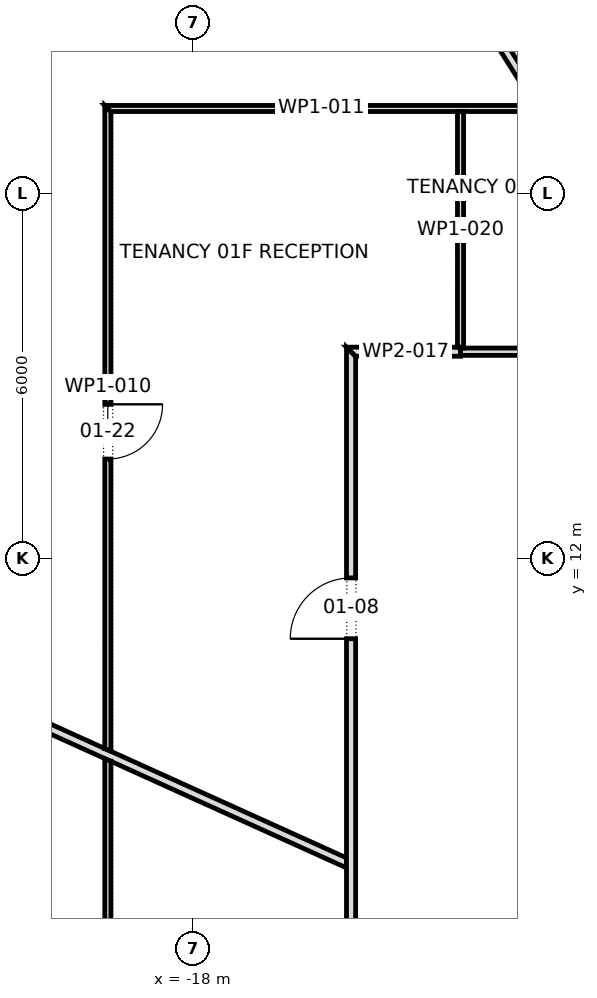
"""IFC4 building model, lengths in metres.
Left out: names, types, materials, properties, quantities, classifications, styles, units other than length and angle.
Written with IfcOpenShell. Run it as: python <this file> out.ifc"""

import sys

from ifc_helpers import new_model, si_unit, direction, frame, frame_2d, origin, place, context, subcontext, project, spatial, polyline, rectangle, outline, extrude, element, fill, save


model = new_model("IFC4")
c1 = context("Model", 3, precision=1e-05, world=origin(), true_north=direction((0.0, 1.0)))
c2 = subcontext(c1, "Body", "Model", "MODEL_VIEW")
j1 = project(units=[si_unit("LENGTHUNIT", "METRE"), si_unit("PLANEANGLEUNIT", "RADIAN")], contexts=[c1])
p1 = place(None, origin())
s1 = spatial("IfcSite", under=j1, at=p1, CompositionType="ELEMENT")
p2 = place(p1, origin())
s2 = spatial("IfcBuilding", under=s1, at=p2, CompositionType="ELEMENT")
p3 = place(p2, frame((0.0, 0.0, 31.9)))
s3 = spatial("IfcBuildingStorey", under=s2, at=p3, CompositionType="ELEMENT", Elevation=31.9)
p4 = place(p3, frame((-31.045, 14.036, 0.0), z_axis=(0.0, 0.0, 1.0), x_axis=(0.911148076593, -0.412079097407, 0.0)))
e1 = element("IfcWall", 1, at=p4, inside=s3, PredefinedType="PARTITIONING", context=c2, shape_type="SweptSolid", body=[
    extrude(outline(polyline([(0.0, -0.075), (1.838, -0.075), (3.677, -0.075), (5.515, -0.075), (7.353, -0.075), (9.191, -0.075), (11.03, -0.075), (12.868, -0.075), (12.869, -0.074), (12.87, -0.075), (14.287, -0.075), (15.705, -0.075), (17.123, -0.075), (17.106, -0.038), (17.106, -0.038), (17.055, 0.075), (15.602, 0.075), (14.149, 0.075), (12.696, 0.075), (12.693, 0.074), (12.692, 0.075), (10.882, 0.075), (9.072, 0.075), (7.262, 0.075), (5.452, 0.075), (3.642, 0.075), (1.831, 0.075), (0.021, 0.075), (0.002, -0.001), (0.0, -0.075)])), origin(), (0.0, 0.0, 1.0), 2.91),
])
p5 = place(p3, frame((-19.4, -1.539, 0.0), z_axis=(0.0, 0.0, 1.0), x_axis=(0.0, 1.0, 0.0)))
e2 = element("IfcWall", 2, at=p5, inside=s3, PredefinedType="PARTITIONING", context=c2, shape_type="SweptSolid", body=[
    extrude(outline(polyline([(0.008, -0.05), (1.707, -0.05), (3.406, -0.05), (5.105, -0.05), (6.804, -0.05), (8.503, -0.05), (10.203, -0.05), (10.248, 0.049), (10.248, 0.05), (8.415, 0.05), (6.583, 0.05), (6.583, 0.048), (6.575, 0.05), (4.932, 0.05), (3.288, 0.05), (1.644, 0.05), (0.0, 0.05), (0.0, 0.046), (0.008, -0.05)])), origin(), (0.0, 0.0, 1.0), 3.9),
])
p6 = place(p5, frame((2.773, 0.0, 0.0)))
e3 = element("IfcOpeningElement", 3, at=p6, cuts=e2, PredefinedType="OPENING", context=c2, shape_type="SweptSolid", body=[
    extrude(rectangle(XDim=0.9, YDim=2.1, at=frame_2d((0.45, 1.05))), frame((0.0, 0.062, 0.0), z_axis=(0.0, -1.0, 0.0), x_axis=(1.0, 0.0, 0.0)), (0.0, 0.0, 1.0), 0.124),
])
p7 = place(p3, frame((-19.438, 4.99, 0.0), z_axis=(0.0, 0.0, 1.0), x_axis=(-0.968638974519, 0.248472407007, 0.0)))
e4 = element("IfcWall", 4, at=p7, inside=s3, PredefinedType="PARTITIONING", context=c2, shape_type="SweptSolid", body=[
    extrude(outline(polyline([(0.025, -0.05), (1.859, -0.05), (3.693, -0.05), (5.527, -0.05), (7.361, -0.05), (9.195, -0.05), (11.029, -0.05), (12.863, -0.05), (14.697, -0.05), (14.706, -0.004), (14.706, 0.05), (12.868, 0.05), (11.03, 0.05), (9.191, 0.05), (7.353, 0.05), (5.515, 0.05), (3.677, 0.05), (1.838, 0.05), (0.0, 0.05), (0.0, 0.049), (0.025, -0.05)])), origin(), (0.0, 0.0, 1.0), 2.892),
])
p8 = place(p7, frame((7.037, 0.0, 0.0)))
e5 = element("IfcOpeningElement", 5, at=p8, cuts=e4, PredefinedType="OPENING", context=c2, shape_type="SweptSolid", body=[
    extrude(rectangle(XDim=0.9, YDim=2.1, at=frame_2d((0.45, 1.05))), frame((0.0, 0.062, 0.0), z_axis=(0.0, -1.0, 0.0), x_axis=(1.0, 0.0, 0.0)), (0.0, 0.0, 1.0), 0.124),
])
p9 = place(p3, frame((-19.4, 8.829, 0.0), z_axis=(0.0, 0.0, 1.0), x_axis=(0.0, 1.0, 0.0)))
e6 = element("IfcWall", 6, at=p9, inside=s3, PredefinedType="PARTITIONING", context=c2, shape_type="SweptSolid", body=[
    extrude(outline(polyline([(0.0, -0.05), (1.753, -0.05), (3.507, -0.05), (5.26, -0.05), (7.014, -0.05), (8.767, -0.05), (10.521, -0.05), (10.521, -0.05), (10.621, 0.05), (8.858, 0.05), (7.095, 0.05), (5.333, 0.05), (3.57, 0.05), (1.808, 0.05), (0.045, 0.05), (0.0, -0.049), (0.0, -0.05)])), origin(), (0.0, 0.0, 1.0), 3.9),
])
p10 = place(p9, frame((4.806, 0.0, 0.0)))
e7 = element("IfcOpeningElement", 7, at=p10, cuts=e6, PredefinedType="OPENING", context=c2, shape_type="SweptSolid", body=[
    extrude(rectangle(XDim=0.9, YDim=2.1, at=frame_2d((0.45, 1.05))), frame((0.0, 0.062, 0.0), z_axis=(0.0, -1.0, 0.0), x_axis=(1.0, 0.0, 0.0)), (0.0, 0.0, 1.0), 0.124),
])
p11 = place(p3, frame((-19.45, 19.4, 0.0), z_axis=(0.0, 0.0, 1.0), x_axis=(1.0, 0.0, 0.0)))
e8 = element("IfcWall", 8, at=p11, inside=s3, PredefinedType="PARTITIONING", context=c2, shape_type="SweptSolid", body=[
    extrude(outline(polyline([(7.075, 0.05), (5.306, 0.05), (3.538, 0.05), (1.769, 0.05), (0.0, 0.05), (0.1, -0.05), (1.844, -0.05), (3.587, -0.05), (5.331, -0.05), (7.075, -0.05), (7.075, 0.05)])), origin(), (0.0, 0.0, 1.0), 3.9),
])
p12 = place(p3, frame((-16.592, 26.26, 0.0), z_axis=(0.0, 0.0, 1.0), x_axis=(0.534158681269, -0.845384234077, 0.0)))
e9 = element("IfcWall", 9, at=p12, inside=s3, PredefinedType="PARTITIONING", context=c2, shape_type="SweptSolid", body=[
    extrude(outline(polyline([(0.0, -0.075), (1.602, -0.075), (3.204, -0.075), (4.805, -0.075), (6.407, -0.075), (8.009, -0.075), (8.01, -0.073), (8.014, -0.075), (9.585, -0.075), (11.157, -0.075), (12.729, -0.075), (12.782, 0.01), (12.782, 0.01), (12.796, 0.032), (12.783, 0.04), (12.805, 0.075), (12.805, 0.075), (11.278, 0.075), (9.75, 0.075), (8.222, 0.075), (8.22, 0.073), (8.217, 0.075), (6.577, 0.075), (4.938, 0.075), (3.299, 0.075), (1.66, 0.075), (0.021, 0.075), (0.003, -0.003), (0.0, -0.07), (0.0, -0.075)])), origin(), (0.0, 0.0, 1.0), 3.11),
])
p13 = place(p3, frame((-15.4, -9.09, 0.0), z_axis=(0.0, 0.0, 1.0), x_axis=(0.0, 1.0, 0.0)))
e10 = element("IfcWall", 10, at=p13, inside=s3, PredefinedType="PARTITIONING", context=c2, shape_type="SweptSolid", body=[
    extrude(outline(polyline([(0.0, -0.075), (1.878, -0.075), (3.756, -0.075), (5.634, -0.075), (7.512, -0.075), (9.39, -0.075), (11.269, -0.075), (13.146, -0.075), (15.025, -0.075), (16.903, -0.075), (18.781, -0.075), (20.659, -0.075), (22.537, -0.075), (24.415, -0.075), (24.565, 0.075), (22.675, 0.075), (20.786, 0.075), (18.896, 0.075), (17.007, 0.075), (15.117, 0.075), (13.227, 0.075), (11.338, 0.075), (9.448, 0.075), (7.558, 0.075), (5.669, 0.075), (3.779, 0.075), (1.89, 0.075), (0.0, 0.075), (0.0, -0.075)])), origin(), (0.0, 0.0, 1.0), 3.9),
])
p14 = place(p13, frame((19.77, 0.0, 0.0)))
e11 = element("IfcOpeningElement", 11, at=p14, cuts=e10, PredefinedType="OPENING", context=c2, shape_type="SweptSolid", body=[
    extrude(rectangle(XDim=1.0, YDim=2.1, at=frame_2d((0.5, 1.05))), frame((0.0, 0.087, 0.0), z_axis=(0.0, -1.0, 0.0), x_axis=(1.0, 0.0, 0.0)), (0.0, 0.0, 1.0), 0.174),
])
p15 = place(p13, frame((11.43, 0.0, 0.0)))
e12 = element("IfcOpeningElement", 12, at=p15, cuts=e10, PredefinedType="OPENING", context=c2, shape_type="SweptSolid", body=[
    extrude(rectangle(XDim=1.0, YDim=2.1, at=frame_2d((0.5, 1.05))), frame((0.0, 0.087, 0.0), z_axis=(0.0, -1.0, 0.0), x_axis=(1.0, 0.0, 0.0)), (0.0, 0.0, 1.0), 0.174),
])
p16 = place(p13, frame((3.405, 0.0, 0.0)))
e13 = element("IfcOpeningElement", 13, at=p16, cuts=e10, PredefinedType="OPENING", context=c2, shape_type="SweptSolid", body=[
    extrude(rectangle(XDim=1.0, YDim=2.1, at=frame_2d((0.5, 1.05))), frame((0.0, 0.087, 0.0), z_axis=(0.0, -1.0, 0.0), x_axis=(1.0, 0.0, 0.0)), (0.0, 0.0, 1.0), 0.174),
])
p17 = place(p3, frame((-15.475, 15.4, 0.0), z_axis=(0.0, 0.0, 1.0), x_axis=(1.0, 0.0, 0.0)))
e14 = element("IfcWall", 14, at=p17, inside=s3, PredefinedType="PARTITIONING", context=c2, shape_type="SweptSolid", body=[
    extrude(outline(polyline([(1.875, 0.075), (0.0, 0.075), (0.15, -0.075), (1.875, -0.075), (1.875, 0.075)])), origin(), (0.0, 0.0, 1.0), 3.9),
])
p18 = place(p3, frame((-13.6, 15.4, 0.0), z_axis=(0.0, 0.0, 1.0), x_axis=(1.0, 0.0, 0.0)))
e15 = element("IfcWall", 15, at=p18, inside=s3, PredefinedType="PARTITIONING", context=c2, shape_type="SweptSolid", body=[
    extrude(rectangle(XDim=3.87, YDim=0.12, at=frame_2d((1.935, 0.0))), origin(), (0.0, 0.0, 1.0), 3.9),
])
p19 = place(p18, frame((1.435, 0.0, 0.0)))
e16 = element("IfcOpeningElement", 16, at=p19, cuts=e15, PredefinedType="OPENING", context=c2, shape_type="SweptSolid", body=[
    extrude(rectangle(XDim=1.0, YDim=2.1, at=frame_2d((0.5, 1.05))), frame((0.0, 0.072, 0.0), z_axis=(0.0, -1.0, 0.0), x_axis=(1.0, 0.0, 0.0)), (0.0, 0.0, 1.0), 0.144),
])
p20 = place(p3, frame((-13.6, 19.35, 0.0), z_axis=(0.0, 0.0, 1.0), x_axis=(0.0, -1.0, 0.0)))
e17 = element("IfcWall", 17, at=p20, inside=s3, PredefinedType="PARTITIONING", context=c2, shape_type="SweptSolid", body=[
    extrude(outline(polyline([(0.0, -0.05), (1.938, -0.05), (3.875, -0.05), (3.875, 0.0), (3.89, 0.0), (3.89, 0.05), (1.945, 0.05), (0.0, 0.05), (0.0, -0.05)])), origin(), (0.0, 0.0, 1.0), 3.9),
])
p21 = place(p14, origin())
e18 = element("IfcDoor", 18, at=p21, inside=s3, OperationType="SINGLE_SWING_RIGHT", PredefinedType="DOOR", context=c2, shape_type="SweptSolid", body=[
    extrude(rectangle(XDim=1.0, YDim=2.1, at=frame_2d((0.5, 1.05))), frame((0.0, 0.025, 0.0), z_axis=(0.0, -1.0, 0.0), x_axis=(1.0, 0.0, 0.0)), (0.0, 0.0, 1.0), 0.05),
])
fill(e11, e18)
p22 = place(p10, frame((0.9, 0.0, 0.0), z_axis=(0.0, 0.0, 1.0), x_axis=(-1.0, 0.0, 0.0)))
e19 = element("IfcDoor", 19, at=p22, inside=s3, OperationType="SINGLE_SWING_RIGHT", PredefinedType="DOOR", context=c2, shape_type="SweptSolid", body=[
    extrude(rectangle(XDim=0.9, YDim=2.1, at=frame_2d((0.45, 1.05))), frame((0.0, 0.025, 0.0), z_axis=(0.0, -1.0, 0.0), x_axis=(1.0, 0.0, 0.0)), (0.0, 0.0, 1.0), 0.05),
])
fill(e7, e19)
save(model, sys.argv[1])
